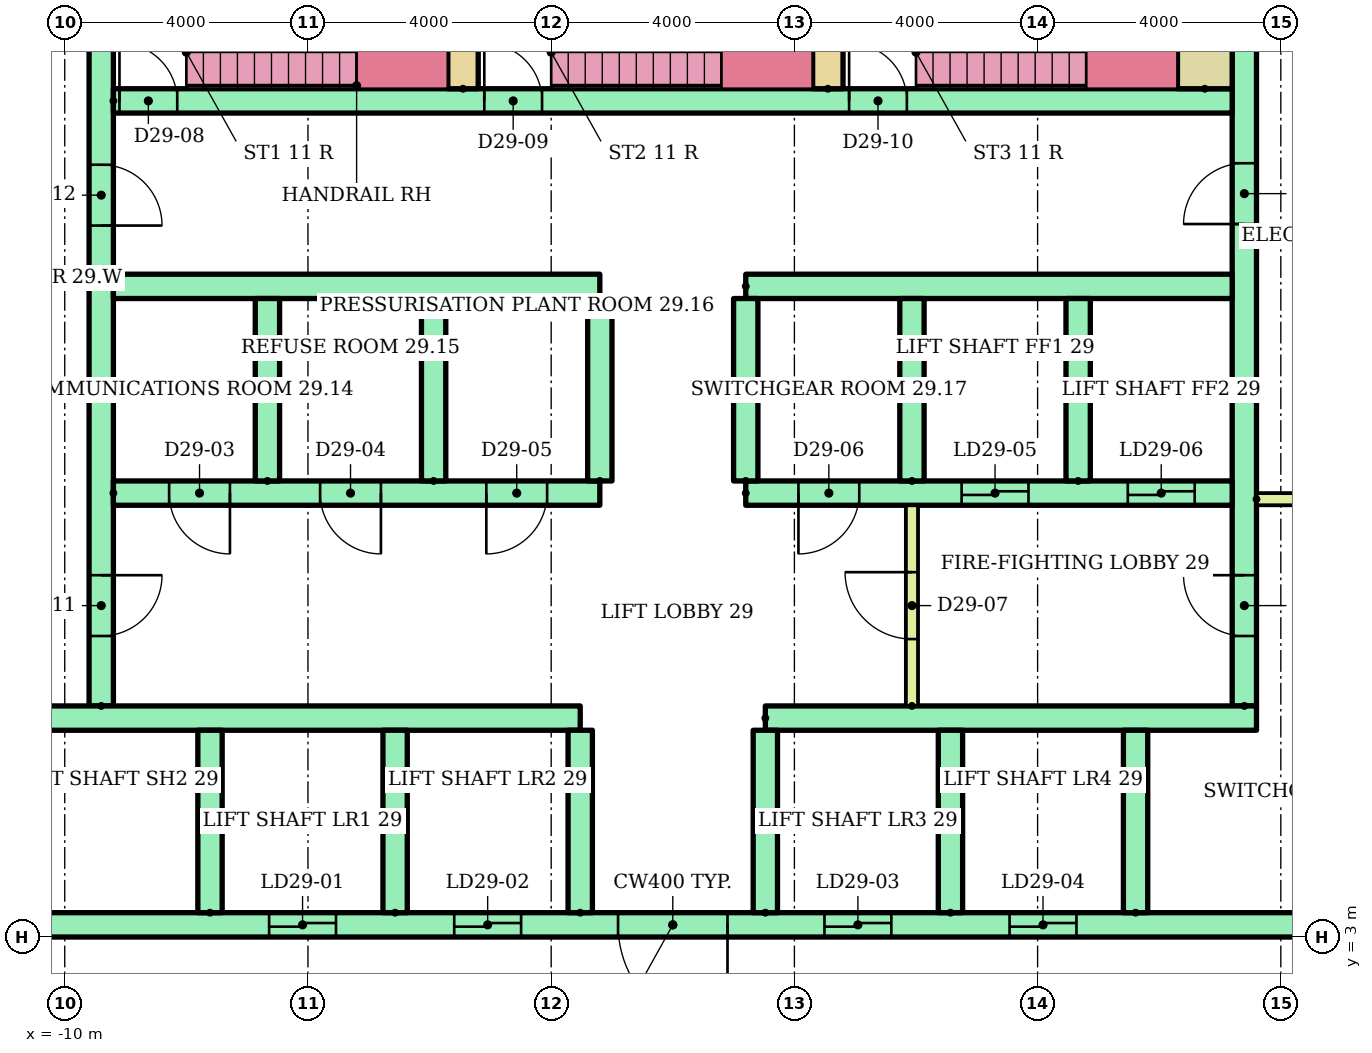
"""IFC4 building model, lengths in metres.
Left out: names, types, materials, properties, quantities, classifications, styles, units other than length and angle.
Written with IfcOpenShell. Run it as: python <this file> out.ifc"""

import sys

from ifc_helpers import new_model, si_unit, direction, frame, frame_2d, origin, place, context, subcontext, project, spatial, rectangle, extrude, element, fill, save


model = new_model("IFC4")
c1 = context("Model", 3, precision=1e-05, world=origin(), true_north=direction((0.0, 1.0)))
c2 = subcontext(c1, "Body", "Model", "MODEL_VIEW")
j1 = project(units=[si_unit("LENGTHUNIT", "METRE"), si_unit("PLANEANGLEUNIT", "RADIAN")], contexts=[c1])
p1 = place(None, origin())
s1 = spatial("IfcSite", under=j1, at=p1, CompositionType="ELEMENT")
p2 = place(p1, origin())
s2 = spatial("IfcBuilding", under=s1, at=p2, CompositionType="ELEMENT")
p3 = place(p2, frame((0.0, 0.0, 115.9)))
s3 = spatial("IfcBuildingStorey", under=s2, at=p3, CompositionType="ELEMENT", Elevation=115.9)
p4 = place(p3, frame((-9.4, 6.8, 0.0), z_axis=(0.0, 0.0, 1.0), x_axis=(0.0, 1.0, 0.0)))
e1 = element("IfcWall", 1, at=p4, inside=s3, PredefinedType="SHEAR", context=c2, shape_type="SweptSolid", body=[
    extrude(rectangle(XDim=12.7, YDim=0.4, at=frame_2d((6.35, 0.0))), origin(), (0.0, 0.0, 1.0), 3.62),
])
p5 = place(p4, frame((1.15, 0.0, 0.0)))
e2 = element("IfcOpeningElement", 2, at=p5, cuts=e1, PredefinedType="OPENING", context=c2, shape_type="SweptSolid", body=[
    extrude(rectangle(XDim=1.0, YDim=2.1, at=frame_2d((0.5, 1.05))), frame((0.0, 0.21, 0.0), z_axis=(0.0, -1.0, 0.0), x_axis=(1.0, 0.0, 0.0)), (0.0, 0.0, 1.0), 0.42),
])
p6 = place(p4, frame((7.9, 0.0, 0.0)))
e3 = element("IfcOpeningElement", 3, at=p6, cuts=e1, PredefinedType="OPENING", context=c2, shape_type="SweptSolid", body=[
    extrude(rectangle(XDim=1.0, YDim=2.1, at=frame_2d((0.5, 1.05))), frame((0.0, 0.21, 0.0), z_axis=(0.0, -1.0, 0.0), x_axis=(1.0, 0.0, 0.0)), (0.0, 0.0, 1.0), 0.42),
])
p7 = place(p3, frame((9.4, 6.8, 0.0), z_axis=(0.0, 0.0, 1.0), x_axis=(0.0, 1.0, 0.0)))
e4 = element("IfcWall", 4, at=p7, inside=s3, PredefinedType="SHEAR", context=c2, shape_type="SweptSolid", body=[
    extrude(rectangle(XDim=12.7, YDim=0.4, at=frame_2d((6.35, 0.0))), origin(), (0.0, 0.0, 1.0), 3.62),
])
p8 = place(p7, frame((1.15, 0.0, 0.0)))
e5 = element("IfcOpeningElement", 5, at=p8, cuts=e4, PredefinedType="OPENING", context=c2, shape_type="SweptSolid", body=[
    extrude(rectangle(XDim=1.0, YDim=2.1, at=frame_2d((0.5, 1.05))), frame((0.0, 0.21, 0.0), z_axis=(0.0, -1.0, 0.0), x_axis=(1.0, 0.0, 0.0)), (0.0, 0.0, 1.0), 0.42),
])
p9 = place(p7, frame((7.925, 0.0, 0.0)))
e6 = element("IfcOpeningElement", 6, at=p9, cuts=e4, PredefinedType="OPENING", context=c2, shape_type="SweptSolid", body=[
    extrude(rectangle(XDim=1.0, YDim=2.1, at=frame_2d((0.5, 1.05))), frame((0.0, 0.21, 0.0), z_axis=(0.0, -1.0, 0.0), x_axis=(1.0, 0.0, 0.0)), (0.0, 0.0, 1.0), 0.42),
])
p10 = place(p3, frame((-13.5, 3.2, 0.0)))
e7 = element("IfcWall", 7, at=p10, inside=s3, PredefinedType="SHEAR", context=c2, shape_type="SweptSolid", body=[
    extrude(rectangle(XDim=27.0, YDim=0.4, at=frame_2d((13.5, 0.0))), origin(), (0.0, 0.0, 1.0), 3.62),
])
p11 = place(p10, frame((6.861, 0.0, 0.0)))
e8 = element("IfcOpeningElement", 8, at=p11, cuts=e7, PredefinedType="OPENING", context=c2, shape_type="SweptSolid", body=[
    extrude(rectangle(XDim=1.1, YDim=2.1, at=frame_2d((0.55, 1.05))), frame((0.0, 0.21, 0.0), z_axis=(0.0, -1.0, 0.0), x_axis=(1.0, 0.0, 0.0)), (0.0, 0.0, 1.0), 0.42),
])
p12 = place(p10, frame((9.906, 0.0, 0.0)))
e9 = element("IfcOpeningElement", 9, at=p12, cuts=e7, PredefinedType="OPENING", context=c2, shape_type="SweptSolid", body=[
    extrude(rectangle(XDim=1.1, YDim=2.1, at=frame_2d((0.55, 1.05))), frame((0.0, 0.21, 0.0), z_axis=(0.0, -1.0, 0.0), x_axis=(1.0, 0.0, 0.0)), (0.0, 0.0, 1.0), 0.42),
])
p13 = place(p10, frame((15.994, 0.0, 0.0)))
e10 = element("IfcOpeningElement", 10, at=p13, cuts=e7, PredefinedType="OPENING", context=c2, shape_type="SweptSolid", body=[
    extrude(rectangle(XDim=1.1, YDim=2.1, at=frame_2d((0.55, 1.05))), frame((0.0, 0.21, 0.0), z_axis=(0.0, -1.0, 0.0), x_axis=(1.0, 0.0, 0.0)), (0.0, 0.0, 1.0), 0.42),
])
p14 = place(p10, frame((19.039, 0.0, 0.0)))
e11 = element("IfcOpeningElement", 11, at=p14, cuts=e7, PredefinedType="OPENING", context=c2, shape_type="SweptSolid", body=[
    extrude(rectangle(XDim=1.1, YDim=2.1, at=frame_2d((0.55, 1.05))), frame((0.0, 0.21, 0.0), z_axis=(0.0, -1.0, 0.0), x_axis=(1.0, 0.0, 0.0)), (0.0, 0.0, 1.0), 0.42),
])
p15 = place(p10, frame((12.6, 0.0, 0.0)))
e12 = element("IfcOpeningElement", 12, at=p15, cuts=e7, PredefinedType="OPENING", context=c2, shape_type="SweptSolid", body=[
    extrude(rectangle(XDim=1.8, YDim=2.1, at=frame_2d((0.9, 1.05))), frame((0.0, 0.21, 0.0), z_axis=(0.0, -1.0, 0.0), x_axis=(1.0, 0.0, 0.0)), (0.0, 0.0, 1.0), 0.42),
])
p16 = place(p3, frame((-13.5, 6.6, 0.0)))
e13 = element("IfcWall", 13, at=p16, inside=s3, PredefinedType="SHEAR", context=c2, shape_type="SweptSolid", body=[
    extrude(rectangle(XDim=11.978, YDim=0.4, at=frame_2d((5.989, 0.0))), origin(), (0.0, 0.0, 1.0), 3.62),
])
p17 = place(p3, frame((1.522, 6.6, 0.0)))
e14 = element("IfcWall", 14, at=p17, inside=s3, PredefinedType="SHEAR", context=c2, shape_type="SweptSolid", body=[
    extrude(rectangle(XDim=8.078, YDim=0.4, at=frame_2d((4.039, 0.0))), origin(), (0.0, 0.0, 1.0), 3.62),
])
for number, where, z_axis, x_axis in (
    (15, (-7.611, 3.4, 0.0), (0.0, 0.0, 1.0), (0.0, 1.0, 0.0)),
    (16, (-4.567, 3.4, 0.0), (0.0, 0.0, 1.0), (0.0, 1.0, 0.0)),
    (17, (-1.522, 3.4, 0.0), (0.0, 0.0, 1.0), (0.0, 1.0, 0.0)),
    (18, (1.522, 3.4, 0.0), (0.0, 0.0, 1.0), (0.0, 1.0, 0.0)),
    (19, (4.567, 3.4, 0.0), (0.0, 0.0, 1.0), (0.0, 1.0, 0.0)),
    (20, (7.611, 3.4, 0.0), (0.0, 0.0, 1.0), (0.0, 1.0, 0.0)),
):
    element("IfcWall", number, at=place(p3, frame(where, z_axis=z_axis, x_axis=x_axis)), inside=s3, PredefinedType="SHEAR", context=c2, shape_type="SweptSolid", body=[
        extrude(rectangle(XDim=3.0, YDim=0.4, at=frame_2d((1.5, 0.0))), origin(), (0.0, 0.0, 1.0), 3.62),
    ])
p18 = place(p3, frame((-9.2, 10.3, 0.0)))
e21 = element("IfcWall", 21, at=p18, inside=s3, PredefinedType="SHEAR", context=c2, shape_type="SweptSolid", body=[
    extrude(rectangle(XDim=8.0, YDim=0.4, at=frame_2d((4.0, 0.0))), origin(), (0.0, 0.0, 1.0), 3.62),
])
p19 = place(p18, frame((0.917, 0.0, 0.0)))
e22 = element("IfcOpeningElement", 22, at=p19, cuts=e21, PredefinedType="OPENING", context=c2, shape_type="SweptSolid", body=[
    extrude(rectangle(XDim=1.0, YDim=2.1, at=frame_2d((0.5, 1.05))), frame((0.0, 0.21, 0.0), z_axis=(0.0, -1.0, 0.0), x_axis=(1.0, 0.0, 0.0)), (0.0, 0.0, 1.0), 0.42),
])
p20 = place(p18, frame((3.4, 0.0, 0.0)))
e23 = element("IfcOpeningElement", 23, at=p20, cuts=e21, PredefinedType="OPENING", context=c2, shape_type="SweptSolid", body=[
    extrude(rectangle(XDim=1.0, YDim=2.1, at=frame_2d((0.5, 1.05))), frame((0.0, 0.21, 0.0), z_axis=(0.0, -1.0, 0.0), x_axis=(1.0, 0.0, 0.0)), (0.0, 0.0, 1.0), 0.42),
])
p21 = place(p18, frame((6.133, 0.0, 0.0)))
e24 = element("IfcOpeningElement", 24, at=p21, cuts=e21, PredefinedType="OPENING", context=c2, shape_type="SweptSolid", body=[
    extrude(rectangle(XDim=1.0, YDim=2.1, at=frame_2d((0.5, 1.05))), frame((0.0, 0.21, 0.0), z_axis=(0.0, -1.0, 0.0), x_axis=(1.0, 0.0, 0.0)), (0.0, 0.0, 1.0), 0.42),
])
p22 = place(p3, frame((-9.2, 13.7, 0.0)))
e25 = element("IfcWall", 25, at=p22, inside=s3, PredefinedType="SHEAR", context=c2, shape_type="SweptSolid", body=[
    extrude(rectangle(XDim=8.0, YDim=0.4, at=frame_2d((4.0, 0.0))), origin(), (0.0, 0.0, 1.0), 3.62),
])
p23 = place(p3, frame((1.2, 10.3, 0.0)))
e26 = element("IfcWall", 26, at=p23, inside=s3, PredefinedType="SHEAR", context=c2, shape_type="SweptSolid", body=[
    extrude(rectangle(XDim=8.0, YDim=0.4, at=frame_2d((4.0, 0.0))), origin(), (0.0, 0.0, 1.0), 3.62),
])
p24 = place(p23, frame((3.55, 0.0, 0.0)))
e27 = element("IfcOpeningElement", 27, at=p24, cuts=e26, PredefinedType="OPENING", context=c2, shape_type="SweptSolid", body=[
    extrude(rectangle(XDim=1.1, YDim=2.1, at=frame_2d((0.55, 1.05))), frame((0.0, 0.21, 0.0), z_axis=(0.0, -1.0, 0.0), x_axis=(1.0, 0.0, 0.0)), (0.0, 0.0, 1.0), 0.42),
])
p25 = place(p23, frame((6.283, 0.0, 0.0)))
e28 = element("IfcOpeningElement", 28, at=p25, cuts=e26, PredefinedType="OPENING", context=c2, shape_type="SweptSolid", body=[
    extrude(rectangle(XDim=1.1, YDim=2.1, at=frame_2d((0.55, 1.05))), frame((0.0, 0.21, 0.0), z_axis=(0.0, -1.0, 0.0), x_axis=(1.0, 0.0, 0.0)), (0.0, 0.0, 1.0), 0.42),
])
p26 = place(p23, frame((0.867, 0.0, 0.0)))
e29 = element("IfcOpeningElement", 29, at=p26, cuts=e26, PredefinedType="OPENING", context=c2, shape_type="SweptSolid", body=[
    extrude(rectangle(XDim=1.0, YDim=2.1, at=frame_2d((0.5, 1.05))), frame((0.0, 0.21, 0.0), z_axis=(0.0, -1.0, 0.0), x_axis=(1.0, 0.0, 0.0)), (0.0, 0.0, 1.0), 0.42),
])
p27 = place(p3, frame((1.2, 13.7, 0.0)))
e30 = element("IfcWall", 30, at=p27, inside=s3, PredefinedType="SHEAR", context=c2, shape_type="SweptSolid", body=[
    extrude(rectangle(XDim=8.0, YDim=0.4, at=frame_2d((4.0, 0.0))), origin(), (0.0, 0.0, 1.0), 3.62),
])
for number, where, z_axis, x_axis in (
    (31, (-6.667, 10.5, 0.0), (0.0, 0.0, 1.0), (0.0, 1.0, 0.0)),
    (32, (-3.933, 10.5, 0.0), (0.0, 0.0, 1.0), (0.0, 1.0, 0.0)),
    (33, (-1.2, 10.5, 0.0), (0.0, 0.0, 1.0), (0.0, 1.0, 0.0)),
    (34, (1.2, 10.5, 0.0), (0.0, 0.0, 1.0), (0.0, 1.0, 0.0)),
    (35, (3.933, 10.5, 0.0), (0.0, 0.0, 1.0), (0.0, 1.0, 0.0)),
    (36, (6.667, 10.5, 0.0), (0.0, 0.0, 1.0), (0.0, 1.0, 0.0)),
):
    element("IfcWall", number, at=place(p3, frame(where, z_axis=z_axis, x_axis=x_axis)), inside=s3, PredefinedType="SHEAR", context=c2, shape_type="SweptSolid", body=[
        extrude(rectangle(XDim=3.0, YDim=0.4, at=frame_2d((1.5, 0.0))), origin(), (0.0, 0.0, 1.0), 3.62),
    ])
p28 = place(p3, frame((3.933, 6.8, 0.0), z_axis=(0.0, 0.0, 1.0), x_axis=(0.0, 1.0, 0.0)))
e37 = element("IfcWall", 37, at=p28, inside=s3, PredefinedType="PARTITIONING", context=c2, shape_type="SweptSolid", body=[
    extrude(rectangle(XDim=3.3, YDim=0.2, at=frame_2d((1.65, 0.0))), origin(), (0.0, 0.0, 1.0), 3.62),
])
p29 = place(p28, frame((1.1, 0.0, 0.0)))
e38 = element("IfcOpeningElement", 38, at=p29, cuts=e37, PredefinedType="OPENING", context=c2, shape_type="SweptSolid", body=[
    extrude(rectangle(XDim=1.1, YDim=2.1, at=frame_2d((0.55, 1.05))), frame((0.0, 0.11, 0.0), z_axis=(0.0, -1.0, 0.0), x_axis=(1.0, 0.0, 0.0)), (0.0, 0.0, 1.0), 0.22),
])
p30 = place(p3, frame((-9.2, 16.75, 0.0)))
e39 = element("IfcWall", 39, at=p30, inside=s3, PredefinedType="SHEAR", context=c2, shape_type="SweptSolid", body=[
    extrude(rectangle(XDim=18.4, YDim=0.4, at=frame_2d((9.2, 0.0))), origin(), (0.0, 0.0, 1.0), 3.62),
])
p31 = place(p30, frame((0.1, 0.0, 0.0)))
e40 = element("IfcOpeningElement", 40, at=p31, cuts=e39, PredefinedType="OPENING", context=c2, shape_type="SweptSolid", body=[
    extrude(rectangle(XDim=0.95, YDim=2.1, at=frame_2d((0.475, 1.05))), frame((0.0, 0.21, 0.0), z_axis=(0.0, -1.0, 0.0), x_axis=(1.0, 0.0, 0.0)), (0.0, 0.0, 1.0), 0.42),
])
p32 = place(p30, frame((6.1, 0.0, 0.0)))
e41 = element("IfcOpeningElement", 41, at=p32, cuts=e39, PredefinedType="OPENING", context=c2, shape_type="SweptSolid", body=[
    extrude(rectangle(XDim=0.95, YDim=2.1, at=frame_2d((0.475, 1.05))), frame((0.0, 0.21, 0.0), z_axis=(0.0, -1.0, 0.0), x_axis=(1.0, 0.0, 0.0)), (0.0, 0.0, 1.0), 0.42),
])
p33 = place(p30, frame((12.1, 0.0, 0.0)))
e42 = element("IfcOpeningElement", 42, at=p33, cuts=e39, PredefinedType="OPENING", context=c2, shape_type="SweptSolid", body=[
    extrude(rectangle(XDim=0.95, YDim=2.1, at=frame_2d((0.475, 1.05))), frame((0.0, 0.21, 0.0), z_axis=(0.0, -1.0, 0.0), x_axis=(1.0, 0.0, 0.0)), (0.0, 0.0, 1.0), 0.42),
])
for number, where, z_axis, x_axis in (
    (43, (-3.45, 16.95, 0.0), (0.0, 0.0, 1.0), (0.0, 1.0, 0.0)),
    (44, (2.55, 16.95, 0.0), (0.0, 0.0, 1.0), (0.0, 1.0, 0.0)),
):
    element("IfcWall", number, at=place(p3, frame(where, z_axis=z_axis, x_axis=x_axis)), inside=s3, PredefinedType="SHEAR", context=c2, shape_type="SweptSolid", body=[
        extrude(rectangle(XDim=2.55, YDim=0.5, at=frame_2d((1.275, 0.0))), origin(), (0.0, 0.0, 1.0), 3.62),
    ])
p34 = place(p3, frame((8.75, 16.95, 0.0), z_axis=(0.0, 0.0, 1.0), x_axis=(0.0, 1.0, 0.0)))
e45 = element("IfcWall", 45, at=p34, inside=s3, PredefinedType="SHEAR", context=c2, shape_type="SweptSolid", body=[
    extrude(rectangle(XDim=2.55, YDim=0.9, at=frame_2d((1.275, 0.0))), origin(), (0.0, 0.0, 1.0), 3.62),
])
p35 = place(p3, frame((9.6, 10.2, 0.0)))
e46 = element("IfcWall", 46, at=p35, inside=s3, PredefinedType="PARTITIONING", context=c2, shape_type="SweptSolid", body=[
    extrude(rectangle(XDim=3.9, YDim=0.2, at=frame_2d((1.95, 0.0))), origin(), (0.0, 0.0, 1.0), 3.62),
])
p36 = place(p11, origin())
e47 = element("IfcDoor", 47, at=p36, inside=s3, OperationType="SLIDING_TO_LEFT", PredefinedType="DOOR", context=c2, shape_type="SweptSolid", body=[
    extrude(rectangle(XDim=1.1, YDim=2.1, at=frame_2d((0.55, 1.05))), frame((0.0, 0.025, 0.0), z_axis=(0.0, -1.0, 0.0), x_axis=(1.0, 0.0, 0.0)), (0.0, 0.0, 1.0), 0.05),
])
fill(e8, e47)
p37 = place(p12, origin())
e48 = element("IfcDoor", 48, at=p37, inside=s3, OperationType="SLIDING_TO_LEFT", PredefinedType="DOOR", context=c2, shape_type="SweptSolid", body=[
    extrude(rectangle(XDim=1.1, YDim=2.1, at=frame_2d((0.55, 1.05))), frame((0.0, 0.025, 0.0), z_axis=(0.0, -1.0, 0.0), x_axis=(1.0, 0.0, 0.0)), (0.0, 0.0, 1.0), 0.05),
])
fill(e9, e48)
p38 = place(p13, origin())
e49 = element("IfcDoor", 49, at=p38, inside=s3, OperationType="SLIDING_TO_LEFT", PredefinedType="DOOR", context=c2, shape_type="SweptSolid", body=[
    extrude(rectangle(XDim=1.1, YDim=2.1, at=frame_2d((0.55, 1.05))), frame((0.0, 0.025, 0.0), z_axis=(0.0, -1.0, 0.0), x_axis=(1.0, 0.0, 0.0)), (0.0, 0.0, 1.0), 0.05),
])
fill(e10, e49)
p39 = place(p14, origin())
e50 = element("IfcDoor", 50, at=p39, inside=s3, OperationType="SLIDING_TO_LEFT", PredefinedType="DOOR", context=c2, shape_type="SweptSolid", body=[
    extrude(rectangle(XDim=1.1, YDim=2.1, at=frame_2d((0.55, 1.05))), frame((0.0, 0.025, 0.0), z_axis=(0.0, -1.0, 0.0), x_axis=(1.0, 0.0, 0.0)), (0.0, 0.0, 1.0), 0.05),
])
fill(e11, e50)
p40 = place(p15, frame((1.8, 0.0, 0.0), z_axis=(0.0, 0.0, 1.0), x_axis=(-1.0, 0.0, 0.0)))
e51 = element("IfcDoor", 51, at=p40, inside=s3, OperationType="DOUBLE_DOOR_SINGLE_SWING", PredefinedType="DOOR", context=c2, shape_type="SweptSolid", body=[
    extrude(rectangle(XDim=1.8, YDim=2.1, at=frame_2d((0.9, 1.05))), frame((0.0, 0.025, 0.0), z_axis=(0.0, -1.0, 0.0), x_axis=(1.0, 0.0, 0.0)), (0.0, 0.0, 1.0), 0.05),
])
fill(e12, e51)
p41 = place(p24, origin())
e52 = element("IfcDoor", 52, at=p41, inside=s3, OperationType="SLIDING_TO_LEFT", PredefinedType="DOOR", context=c2, shape_type="SweptSolid", body=[
    extrude(rectangle(XDim=1.1, YDim=2.1, at=frame_2d((0.55, 1.05))), frame((0.0, 0.025, 0.0), z_axis=(0.0, -1.0, 0.0), x_axis=(1.0, 0.0, 0.0)), (0.0, 0.0, 1.0), 0.05),
])
fill(e27, e52)
p42 = place(p25, origin())
e53 = element("IfcDoor", 53, at=p42, inside=s3, OperationType="SLIDING_TO_LEFT", PredefinedType="DOOR", context=c2, shape_type="SweptSolid", body=[
    extrude(rectangle(XDim=1.1, YDim=2.1, at=frame_2d((0.55, 1.05))), frame((0.0, 0.025, 0.0), z_axis=(0.0, -1.0, 0.0), x_axis=(1.0, 0.0, 0.0)), (0.0, 0.0, 1.0), 0.05),
])
fill(e28, e53)
p43 = place(p19, frame((1.0, 0.0, 0.0), z_axis=(0.0, 0.0, 1.0), x_axis=(-1.0, 0.0, 0.0)))
e54 = element("IfcDoor", 54, at=p43, inside=s3, OperationType="SINGLE_SWING_RIGHT", PredefinedType="DOOR", context=c2, shape_type="SweptSolid", body=[
    extrude(rectangle(XDim=1.0, YDim=2.1, at=frame_2d((0.5, 1.05))), frame((0.0, 0.025, 0.0), z_axis=(0.0, -1.0, 0.0), x_axis=(1.0, 0.0, 0.0)), (0.0, 0.0, 1.0), 0.05),
])
fill(e22, e54)
p44 = place(p20, frame((1.0, 0.0, 0.0), z_axis=(0.0, 0.0, 1.0), x_axis=(-1.0, 0.0, 0.0)))
e55 = element("IfcDoor", 55, at=p44, inside=s3, OperationType="SINGLE_SWING_RIGHT", PredefinedType="DOOR", context=c2, shape_type="SweptSolid", body=[
    extrude(rectangle(XDim=1.0, YDim=2.1, at=frame_2d((0.5, 1.05))), frame((0.0, 0.025, 0.0), z_axis=(0.0, -1.0, 0.0), x_axis=(1.0, 0.0, 0.0)), (0.0, 0.0, 1.0), 0.05),
])
fill(e23, e55)
p45 = place(p21, frame((1.0, 0.0, 0.0), z_axis=(0.0, 0.0, 1.0), x_axis=(-1.0, 0.0, 0.0)))
e56 = element("IfcDoor", 56, at=p45, inside=s3, OperationType="SINGLE_SWING_LEFT", PredefinedType="DOOR", context=c2, shape_type="SweptSolid", body=[
    extrude(rectangle(XDim=1.0, YDim=2.1, at=frame_2d((0.5, 1.05))), frame((0.0, 0.025, 0.0), z_axis=(0.0, -1.0, 0.0), x_axis=(1.0, 0.0, 0.0)), (0.0, 0.0, 1.0), 0.05),
])
fill(e24, e56)
p46 = place(p26, frame((1.0, 0.0, 0.0), z_axis=(0.0, 0.0, 1.0), x_axis=(-1.0, 0.0, 0.0)))
e57 = element("IfcDoor", 57, at=p46, inside=s3, OperationType="SINGLE_SWING_LEFT", PredefinedType="DOOR", context=c2, shape_type="SweptSolid", body=[
    extrude(rectangle(XDim=1.0, YDim=2.1, at=frame_2d((0.5, 1.05))), frame((0.0, 0.025, 0.0), z_axis=(0.0, -1.0, 0.0), x_axis=(1.0, 0.0, 0.0)), (0.0, 0.0, 1.0), 0.05),
])
fill(e29, e57)
p47 = place(p29, origin())
e58 = element("IfcDoor", 58, at=p47, inside=s3, OperationType="SINGLE_SWING_RIGHT", PredefinedType="DOOR", context=c2, shape_type="SweptSolid", body=[
    extrude(rectangle(XDim=1.1, YDim=2.1, at=frame_2d((0.55, 1.05))), frame((0.0, 0.025, 0.0), z_axis=(0.0, -1.0, 0.0), x_axis=(1.0, 0.0, 0.0)), (0.0, 0.0, 1.0), 0.05),
])
fill(e38, e58)
p48 = place(p31, origin())
e59 = element("IfcDoor", 59, at=p48, inside=s3, OperationType="SINGLE_SWING_LEFT", PredefinedType="DOOR", context=c2, shape_type="SweptSolid", body=[
    extrude(rectangle(XDim=0.95, YDim=2.1, at=frame_2d((0.475, 1.05))), frame((0.0, 0.025, 0.0), z_axis=(0.0, -1.0, 0.0), x_axis=(1.0, 0.0, 0.0)), (0.0, 0.0, 1.0), 0.05),
])
fill(e40, e59)
p49 = place(p32, origin())
e60 = element("IfcDoor", 60, at=p49, inside=s3, OperationType="SINGLE_SWING_LEFT", PredefinedType="DOOR", context=c2, shape_type="SweptSolid", body=[
    extrude(rectangle(XDim=0.95, YDim=2.1, at=frame_2d((0.475, 1.05))), frame((0.0, 0.025, 0.0), z_axis=(0.0, -1.0, 0.0), x_axis=(1.0, 0.0, 0.0)), (0.0, 0.0, 1.0), 0.05),
])
fill(e41, e60)
p50 = place(p33, origin())
e61 = element("IfcDoor", 61, at=p50, inside=s3, OperationType="SINGLE_SWING_LEFT", PredefinedType="DOOR", context=c2, shape_type="SweptSolid", body=[
    extrude(rectangle(XDim=0.95, YDim=2.1, at=frame_2d((0.475, 1.05))), frame((0.0, 0.025, 0.0), z_axis=(0.0, -1.0, 0.0), x_axis=(1.0, 0.0, 0.0)), (0.0, 0.0, 1.0), 0.05),
])
fill(e42, e61)
p51 = place(p5, frame((1.0, 0.0, 0.0), z_axis=(0.0, 0.0, 1.0), x_axis=(-1.0, 0.0, 0.0)))
e62 = element("IfcDoor", 62, at=p51, inside=s3, OperationType="SINGLE_SWING_RIGHT", PredefinedType="DOOR", context=c2, shape_type="SweptSolid", body=[
    extrude(rectangle(XDim=1.0, YDim=2.1, at=frame_2d((0.5, 1.05))), frame((0.0, 0.025, 0.0), z_axis=(0.0, -1.0, 0.0), x_axis=(1.0, 0.0, 0.0)), (0.0, 0.0, 1.0), 0.05),
])
fill(e2, e62)
p52 = place(p6, frame((1.0, 0.0, 0.0), z_axis=(0.0, 0.0, 1.0), x_axis=(-1.0, 0.0, 0.0)))
e63 = element("IfcDoor", 63, at=p52, inside=s3, OperationType="SINGLE_SWING_LEFT", PredefinedType="DOOR", context=c2, shape_type="SweptSolid", body=[
    extrude(rectangle(XDim=1.0, YDim=2.1, at=frame_2d((0.5, 1.05))), frame((0.0, 0.025, 0.0), z_axis=(0.0, -1.0, 0.0), x_axis=(1.0, 0.0, 0.0)), (0.0, 0.0, 1.0), 0.05),
])
fill(e3, e63)
p53 = place(p8, origin())
e64 = element("IfcDoor", 64, at=p53, inside=s3, OperationType="SINGLE_SWING_RIGHT", PredefinedType="DOOR", context=c2, shape_type="SweptSolid", body=[
    extrude(rectangle(XDim=1.0, YDim=2.1, at=frame_2d((0.5, 1.05))), frame((0.0, 0.025, 0.0), z_axis=(0.0, -1.0, 0.0), x_axis=(1.0, 0.0, 0.0)), (0.0, 0.0, 1.0), 0.05),
])
fill(e5, e64)
p54 = place(p9, origin())
e65 = element("IfcDoor", 65, at=p54, inside=s3, OperationType="SINGLE_SWING_LEFT", PredefinedType="DOOR", context=c2, shape_type="SweptSolid", body=[
    extrude(rectangle(XDim=1.0, YDim=2.1, at=frame_2d((0.5, 1.05))), frame((0.0, 0.025, 0.0), z_axis=(0.0, -1.0, 0.0), x_axis=(1.0, 0.0, 0.0)), (0.0, 0.0, 1.0), 0.05),
])
fill(e6, e65)
save(model, sys.argv[1])
